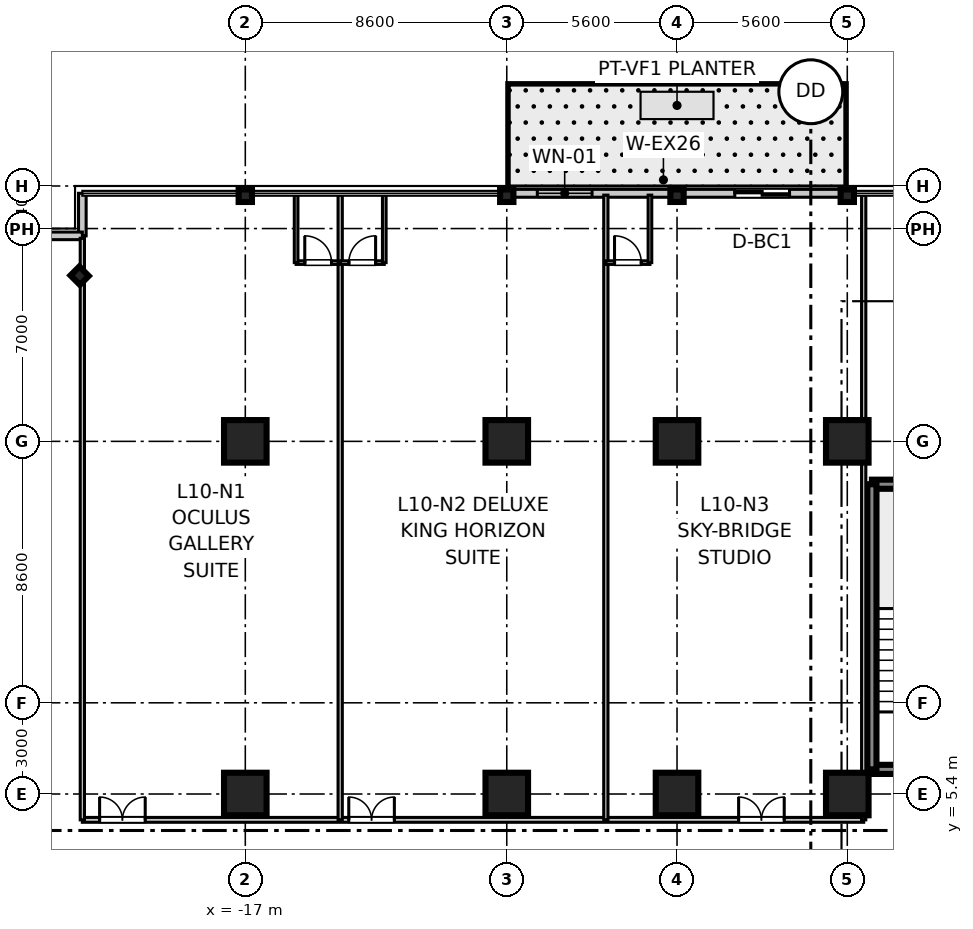
"""IFC4 building model, lengths in metres.
Left out: names, types, materials, properties, quantities, classifications, styles, units other than length and angle.
Written with IfcOpenShell. Run it as: python <this file> out.ifc"""

import sys

from ifc_helpers import new_model, si_unit, direction, frame, frame_2d, origin, origin_2d, place, context, subcontext, project, spatial, rectangle, i_section, extrude, source, transform, mapped, element, fill, save


model = new_model("IFC4")
c1 = context("Model", 3, precision=1e-05, world=origin(), true_north=direction((0.0, 1.0)))
c2 = subcontext(c1, "Body", "Model", "MODEL_VIEW")
j1 = project(units=[si_unit("LENGTHUNIT", "METRE"), si_unit("PLANEANGLEUNIT", "RADIAN")], contexts=[c1])
p1 = place(None, origin())
s1 = spatial("IfcSite", under=j1, at=p1, CompositionType="ELEMENT")
p2 = place(p1, origin())
s2 = spatial("IfcBuilding", under=s1, at=p2, CompositionType="ELEMENT")
p3 = place(p2, frame((0.0, 0.0, 47.0)))
s3 = spatial("IfcBuildingStorey", under=s2, at=p3, CompositionType="ELEMENT", Elevation=47.0)
m1 = source(origin(), c2, "Body", "SweptSolid", [
    extrude(rectangle(XDim=1.4, YDim=1.4, at=origin_2d()), origin(), (0.0, 0.0, 1.0), 3.605),
])
for number, where, z_axis, x_axis in (
    (1, (-17.0, 5.4, 0.0), (0.0, 0.0, 1.0), (1.0, 0.0, 0.0)),
    (2, (-17.0, 17.0, 0.0), (0.0, 0.0, 1.0), (1.0, 0.0, 0.0)),
    (3, (-8.4, 5.4, 0.0), (0.0, 0.0, 1.0), (1.0, 0.0, 0.0)),
    (4, (-8.4, 17.0, 0.0), (0.0, 0.0, 1.0), (1.0, 0.0, 0.0)),
    (5, (-2.8, 5.4, 0.0), (0.0, 0.0, 1.0), (1.0, 0.0, 0.0)),
    (6, (-2.8, 17.0, 0.0), (0.0, 0.0, 1.0), (1.0, 0.0, 0.0)),
    (7, (2.8, 5.4, 0.0), (0.0, 0.0, 1.0), (1.0, 0.0, 0.0)),
    (8, (2.8, 17.0, 0.0), (0.0, 0.0, 1.0), (1.0, 0.0, 0.0)),
):
    element("IfcColumn", number, at=place(p3, frame(where, z_axis=z_axis, x_axis=x_axis)), inside=s3, PredefinedType="COLUMN", context=c2, shape_type="MappedRepresentation", body=[
        mapped(m1, transform((0.0, 0.0, 0.0), scale=1.0)),
    ])
m2 = source(origin(), c2, "Body", "SweptSolid", [
    extrude(i_section(OverallWidth=0.412, OverallDepth=0.438, WebThickness=0.023, FlangeThickness=0.036, at=origin_2d()), origin(), (0.0, 0.0, 1.0), 3.605),
])
for number, where, z_axis, x_axis in (
    (9, (-17.0, 25.08, 0.0), (0.0, 0.0, 1.0), (0.0, 1.0, 0.0)),
    (10, (-8.4, 25.08, 0.0), (0.0, 0.0, 1.0), (0.0, 1.0, 0.0)),
    (11, (-2.8, 25.08, 0.0), (0.0, 0.0, 1.0), (0.0, 1.0, 0.0)),
    (12, (2.8, 25.08, 0.0), (0.0, 0.0, 1.0), (0.0, 1.0, 0.0)),
    (13, (-22.45, 22.45, 0.0), (0.0, 0.0, 1.0), (0.707, 0.707, 0.0)),
):
    element("IfcColumn", number, at=place(p3, frame(where, z_axis=z_axis, x_axis=x_axis)), inside=s3, PredefinedType="COLUMN", context=c2, shape_type="MappedRepresentation", body=[
        mapped(m2, transform((0.0, 0.0, 0.0), scale=1.0)),
    ])
m3 = source(origin(), c2, "Body", "SweptSolid", [
    extrude(rectangle(XDim=3.98, YDim=0.3, at=frame_2d((1.99, 0.0))), origin(), (0.0, 0.0, 1.0), 3.37),
])
for number, where, z_axis, x_axis in (
    (14, (3.61, 6.21, 0.0), (0.0, 0.0, 1.0), (1.0, 0.0, 0.0)),
    (15, (3.61, 15.59, 0.0), (0.0, 0.0, 1.0), (1.0, 0.0, 0.0)),
):
    element("IfcWall", number, at=place(p3, frame(where, z_axis=z_axis, x_axis=x_axis)), inside=s3, PredefinedType="SHEAR", context=c2, shape_type="MappedRepresentation", body=[
        mapped(m3, transform((0.0, 0.0, 0.0), scale=1.0)),
    ])
m4 = source(origin(), c2, "Body", "SweptSolid", [
    extrude(rectangle(XDim=9.38, YDim=0.3, at=frame_2d((4.69, 0.0))), origin(), (0.0, 0.0, 1.0), 3.37),
])
p4 = place(p3, frame((3.61, 6.21, 0.0), z_axis=(0.0, 0.0, 1.0), x_axis=(0.0, 1.0, 0.0)))
e16 = element("IfcWall", 16, at=p4, inside=s3, PredefinedType="SHEAR", context=c2, shape_type="MappedRepresentation", body=[
    mapped(m4, transform((0.0, 0.0, 0.0), scale=1.0)),
])
m5 = source(origin(), c2, "Body", "SweptSolid", [
    extrude(rectangle(XDim=1.4, YDim=0.25, at=frame_2d((0.7, 0.0))), origin(), (0.0, 0.0, 1.0), 3.37),
])
for number, where, z_axis, x_axis in (
    (17, (-22.36, 23.76, 0.0), (0.0, 0.0, 1.0), (0.0, 1.0, 0.0)),
    (18, (-23.76, 23.76, 0.0), (0.0, 0.0, 1.0), (1.0, 0.0, 0.0)),
):
    element("IfcWall", number, at=place(p3, frame(where, z_axis=z_axis, x_axis=x_axis)), inside=s3, PredefinedType="STANDARD", context=c2, shape_type="MappedRepresentation", body=[
        mapped(m5, transform((0.0, 0.0, 0.0), scale=1.0)),
    ])
m6 = source(origin(), c2, "Body", "SweptSolid", [
    extrude(rectangle(XDim=11.2, YDim=0.26, at=frame_2d((5.6, 0.0))), origin(), (0.0, 0.0, 1.0), 2.85),
])
p5 = place(p3, frame((-8.4, 25.16, 0.0), z_axis=(0.0, 0.0, 1.0), x_axis=(1.0, 0.0, 0.0)))
e19 = element("IfcWall", 19, at=p5, inside=s3, PredefinedType="STANDARD", context=c2, shape_type="MappedRepresentation", body=[
    mapped(m6, transform((0.0, 0.0, 0.0), scale=1.0)),
])
p6 = place(p5, frame((7.5, 0.0, 0.0)))
e20 = element("IfcOpeningElement", 20, at=p6, cuts=e19, PredefinedType="OPENING", context=c2, shape_type="SweptSolid", body=[
    extrude(rectangle(XDim=1.8, YDim=2.25, at=frame_2d((0.9, 1.125))), frame((0.0, 0.14, 0.0), z_axis=(0.0, -1.0, 0.0), x_axis=(1.0, 0.0, 0.0)), (0.0, 0.0, 1.0), 0.28),
])
p7 = place(p5, frame((1.005, 0.0, 0.85)))
e21 = element("IfcOpeningElement", 21, at=p7, cuts=e19, PredefinedType="OPENING", context=c2, shape_type="SweptSolid", body=[
    extrude(rectangle(XDim=1.8, YDim=1.5, at=frame_2d((0.9, 0.75))), frame((0.0, 0.14, 0.0), z_axis=(0.0, -1.0, 0.0), x_axis=(1.0, 0.0, 0.0)), (0.0, 0.0, 1.0), 0.28),
])
m7 = source(origin(), c2, "Body", "SweptSolid", [
    extrude(rectangle(XDim=25.7, YDim=0.16, at=frame_2d((12.85, 0.0))), origin(), (0.0, 0.0, 1.0), 2.71),
])
p8 = place(p3, frame((-22.36, 4.55, 0.0), z_axis=(0.0, 0.0, 1.0), x_axis=(1.0, 0.0, 0.0)))
e22 = element("IfcWall", 22, at=p8, inside=s3, PredefinedType="PARTITIONING", context=c2, shape_type="MappedRepresentation", body=[
    mapped(m7, transform((0.0, 0.0, 0.0), scale=1.0)),
])
p9 = place(p8, frame((0.568, 0.0, 0.0)))
e23 = element("IfcOpeningElement", 23, at=p9, cuts=e22, PredefinedType="OPENING", context=c2, shape_type="SweptSolid", body=[
    extrude(rectangle(XDim=1.5, YDim=2.15, at=frame_2d((0.75, 1.075))), frame((0.0, 0.09, 0.0), z_axis=(0.0, -1.0, 0.0), x_axis=(1.0, 0.0, 0.0)), (0.0, 0.0, 1.0), 0.18),
])
p10 = place(p8, frame((8.763, 0.0, 0.0)))
e24 = element("IfcOpeningElement", 24, at=p10, cuts=e22, PredefinedType="OPENING", context=c2, shape_type="SweptSolid", body=[
    extrude(rectangle(XDim=1.5, YDim=2.15, at=frame_2d((0.75, 1.075))), frame((0.0, 0.09, 0.0), z_axis=(0.0, -1.0, 0.0), x_axis=(1.0, 0.0, 0.0)), (0.0, 0.0, 1.0), 0.18),
])
p11 = place(p8, frame((21.586, 0.0, 0.0)))
e25 = element("IfcOpeningElement", 25, at=p11, cuts=e22, PredefinedType="OPENING", context=c2, shape_type="SweptSolid", body=[
    extrude(rectangle(XDim=1.5, YDim=2.15, at=frame_2d((0.75, 1.075))), frame((0.0, 0.09, 0.0), z_axis=(0.0, -1.0, 0.0), x_axis=(1.0, 0.0, 0.0)), (0.0, 0.0, 1.0), 0.18),
])
m8 = source(origin(), c2, "Body", "SweptSolid", [
    extrude(rectangle(XDim=19.13, YDim=0.14, at=frame_2d((9.565, 0.0))), origin(), (0.0, 0.0, 1.0), 2.71),
])
p12 = place(p3, frame((-22.36, 4.55, 0.0), z_axis=(0.0, 0.0, 1.0), x_axis=(0.0, 1.0, 0.0)))
e26 = element("IfcWall", 26, at=p12, inside=s3, PredefinedType="PARTITIONING", context=c2, shape_type="MappedRepresentation", body=[
    mapped(m8, transform((0.0, 0.0, 0.0), scale=1.0)),
])
m9 = source(origin(), c2, "Body", "SweptSolid", [
    extrude(rectangle(XDim=20.55, YDim=0.14, at=frame_2d((10.275, 0.0))), origin(), (0.0, 0.0, 1.0), 2.71),
])
p13 = place(p3, frame((3.34, 4.55, 0.0), z_axis=(0.0, 0.0, 1.0), x_axis=(0.0, 1.0, 0.0)))
e27 = element("IfcWall", 27, at=p13, inside=s3, PredefinedType="PARTITIONING", context=c2, shape_type="MappedRepresentation", body=[
    mapped(m9, transform((0.0, 0.0, 0.0), scale=1.0)),
])
m10 = source(origin(), c2, "Body", "SweptSolid", [
    extrude(rectangle(XDim=1.45, YDim=0.12, at=frame_2d((0.725, 0.0))), origin(), (0.0, 0.0, 1.0), 2.71),
])
p14 = place(p3, frame((-15.329, 22.88, 0.0), z_axis=(0.0, 0.0, 1.0), x_axis=(1.0, 0.0, 0.0)))
e28 = element("IfcWall", 28, at=p14, inside=s3, PredefinedType="PARTITIONING", context=c2, shape_type="MappedRepresentation", body=[
    mapped(m10, transform((0.0, 0.0, 0.0), scale=1.0)),
])
p15 = place(p14, frame((0.285, 0.0, 0.0)))
e29 = element("IfcOpeningElement", 29, at=p15, cuts=e28, PredefinedType="OPENING", context=c2, shape_type="SweptSolid", body=[
    extrude(rectangle(XDim=0.88, YDim=2.1, at=frame_2d((0.44, 1.05))), frame((0.0, 0.07, 0.0), z_axis=(0.0, -1.0, 0.0), x_axis=(1.0, 0.0, 0.0)), (0.0, 0.0, 1.0), 0.14),
])
m11 = source(origin(), c2, "Body", "SweptSolid", [
    extrude(rectangle(XDim=2.22, YDim=0.12, at=frame_2d((1.11, 0.0))), origin(), (0.0, 0.0, 1.0), 2.71),
])
p16 = place(p3, frame((-15.329, 22.88, 0.0), z_axis=(0.0, 0.0, 1.0), x_axis=(0.0, 1.0, 0.0)))
e30 = element("IfcWall", 30, at=p16, inside=s3, PredefinedType="PARTITIONING", context=c2, shape_type="MappedRepresentation", body=[
    mapped(m11, transform((0.0, 0.0, 0.0), scale=1.0)),
])
p17 = place(p3, frame((-13.879, 4.55, 0.0), z_axis=(0.0, 0.0, 1.0), x_axis=(0.0, 1.0, 0.0)))
e31 = element("IfcWall", 31, at=p17, inside=s3, PredefinedType="PARTITIONING", context=c2, shape_type="MappedRepresentation", body=[
    mapped(m9, transform((0.0, 0.0, 0.0), scale=1.0)),
])
m12 = source(origin(), c2, "Body", "SweptSolid", [
    extrude(rectangle(XDim=1.45, YDim=0.12, at=frame_2d((0.725, 0.0))), origin(), (0.0, 0.0, 1.0), 2.71),
])
p18 = place(p3, frame((-13.879, 22.88, 0.0), z_axis=(0.0, 0.0, 1.0), x_axis=(1.0, 0.0, 0.0)))
e32 = element("IfcWall", 32, at=p18, inside=s3, PredefinedType="PARTITIONING", context=c2, shape_type="MappedRepresentation", body=[
    mapped(m12, transform((0.0, 0.0, 0.0), scale=1.0)),
])
p19 = place(p18, frame((0.285, 0.0, 0.0)))
e33 = element("IfcOpeningElement", 33, at=p19, cuts=e32, PredefinedType="OPENING", context=c2, shape_type="SweptSolid", body=[
    extrude(rectangle(XDim=0.88, YDim=2.1, at=frame_2d((0.44, 1.05))), frame((0.0, 0.07, 0.0), z_axis=(0.0, -1.0, 0.0), x_axis=(1.0, 0.0, 0.0)), (0.0, 0.0, 1.0), 0.14),
])
p20 = place(p3, frame((-12.429, 22.88, 0.0), z_axis=(0.0, 0.0, 1.0), x_axis=(0.0, 1.0, 0.0)))
e34 = element("IfcWall", 34, at=p20, inside=s3, PredefinedType="PARTITIONING", context=c2, shape_type="MappedRepresentation", body=[
    mapped(m11, transform((0.0, 0.0, 0.0), scale=1.0)),
])
p21 = place(p3, frame((-5.141, 4.55, 0.0), z_axis=(0.0, 0.0, 1.0), x_axis=(0.0, 1.0, 0.0)))
e35 = element("IfcWall", 35, at=p21, inside=s3, PredefinedType="PARTITIONING", context=c2, shape_type="MappedRepresentation", body=[
    mapped(m9, transform((0.0, 0.0, 0.0), scale=1.0)),
])
p22 = place(p3, frame((-5.141, 22.88, 0.0), z_axis=(0.0, 0.0, 1.0), x_axis=(1.0, 0.0, 0.0)))
e36 = element("IfcWall", 36, at=p22, inside=s3, PredefinedType="PARTITIONING", context=c2, shape_type="MappedRepresentation", body=[
    mapped(m10, transform((0.0, 0.0, 0.0), scale=1.0)),
])
p23 = place(p22, frame((0.285, 0.0, 0.0)))
e37 = element("IfcOpeningElement", 37, at=p23, cuts=e36, PredefinedType="OPENING", context=c2, shape_type="SweptSolid", body=[
    extrude(rectangle(XDim=0.88, YDim=2.1, at=frame_2d((0.44, 1.05))), frame((0.0, 0.07, 0.0), z_axis=(0.0, -1.0, 0.0), x_axis=(1.0, 0.0, 0.0)), (0.0, 0.0, 1.0), 0.14),
])
p24 = place(p3, frame((-3.691, 22.88, 0.0), z_axis=(0.0, 0.0, 1.0), x_axis=(0.0, 1.0, 0.0)))
e38 = element("IfcWall", 38, at=p24, inside=s3, PredefinedType="PARTITIONING", context=c2, shape_type="MappedRepresentation", body=[
    mapped(m11, transform((0.0, 0.0, 0.0), scale=1.0)),
])
m13 = source(origin(), c2, "Body", "SweptSolid", [
    extrude(rectangle(XDim=0.88, YDim=2.1, at=frame_2d((0.44, 1.05))), frame((0.0, 0.025, 0.0), z_axis=(0.0, -1.0, 0.0), x_axis=(1.0, 0.0, 0.0)), (0.0, 0.0, 1.0), 0.05),
])
p25 = place(p15, origin())
e39 = element("IfcDoor", 39, at=p25, inside=s3, OperationType="SINGLE_SWING_LEFT", PredefinedType="DOOR", context=c2, shape_type="MappedRepresentation", body=[
    mapped(m13, transform((0.0, 0.0, 0.0), scale=1.0)),
])
fill(e29, e39)
m14 = source(origin(), c2, "Body", "SweptSolid", [
    extrude(rectangle(XDim=1.5, YDim=2.15, at=frame_2d((0.75, 1.075))), frame((0.0, 0.025, 0.0), z_axis=(0.0, -1.0, 0.0), x_axis=(1.0, 0.0, 0.0)), (0.0, 0.0, 1.0), 0.05),
])
p26 = place(p9, origin())
e40 = element("IfcDoor", 40, at=p26, inside=s3, OperationType="DOUBLE_DOOR_SINGLE_SWING", PredefinedType="DOOR", context=c2, shape_type="MappedRepresentation", body=[
    mapped(m14, transform((0.0, 0.0, 0.0), scale=1.0)),
])
fill(e23, e40)
p27 = place(p19, origin())
e41 = element("IfcDoor", 41, at=p27, inside=s3, OperationType="SINGLE_SWING_RIGHT", PredefinedType="DOOR", context=c2, shape_type="MappedRepresentation", body=[
    mapped(m13, transform((0.0, 0.0, 0.0), scale=1.0)),
])
fill(e33, e41)
p28 = place(p10, origin())
e42 = element("IfcDoor", 42, at=p28, inside=s3, OperationType="DOUBLE_DOOR_SINGLE_SWING", PredefinedType="DOOR", context=c2, shape_type="MappedRepresentation", body=[
    mapped(m14, transform((0.0, 0.0, 0.0), scale=1.0)),
])
fill(e24, e42)
p29 = place(p23, origin())
e43 = element("IfcDoor", 43, at=p29, inside=s3, OperationType="SINGLE_SWING_LEFT", PredefinedType="DOOR", context=c2, shape_type="MappedRepresentation", body=[
    mapped(m13, transform((0.0, 0.0, 0.0), scale=1.0)),
])
fill(e37, e43)
p30 = place(p11, origin())
e44 = element("IfcDoor", 44, at=p30, inside=s3, OperationType="DOUBLE_DOOR_SINGLE_SWING", PredefinedType="DOOR", context=c2, shape_type="MappedRepresentation", body=[
    mapped(m14, transform((0.0, 0.0, 0.0), scale=1.0)),
])
fill(e25, e44)
m15 = source(origin(), c2, "Body", "SweptSolid", [
    extrude(rectangle(XDim=1.8, YDim=2.25, at=frame_2d((0.9, 1.125))), frame((0.0, 0.025, 0.0), z_axis=(0.0, -1.0, 0.0), x_axis=(1.0, 0.0, 0.0)), (0.0, 0.0, 1.0), 0.05),
])
p31 = place(p6, origin())
e45 = element("IfcDoor", 45, at=p31, inside=s3, OperationType="DOUBLE_DOOR_SLIDING", PredefinedType="DOOR", context=c2, shape_type="MappedRepresentation", body=[
    mapped(m15, transform((0.0, 0.0, 0.0), scale=1.0)),
])
fill(e20, e45)
m16 = source(origin(), c2, "Body", "SweptSolid", [
    extrude(rectangle(XDim=1.8, YDim=1.5, at=frame_2d((0.9, 0.75))), frame((0.0, 0.03, 0.0), z_axis=(0.0, -1.0, 0.0), x_axis=(1.0, 0.0, 0.0)), (0.0, 0.0, 1.0), 0.06),
])
p32 = place(p7, origin())
e46 = element("IfcWindow", 46, at=p32, inside=s3, PartitioningType="SINGLE_PANEL", PredefinedType="WINDOW", context=c2, shape_type="MappedRepresentation", body=[
    mapped(m16, transform((0.0, 0.0, 0.0), scale=1.0)),
])
fill(e21, e46)
save(model, sys.argv[1])
